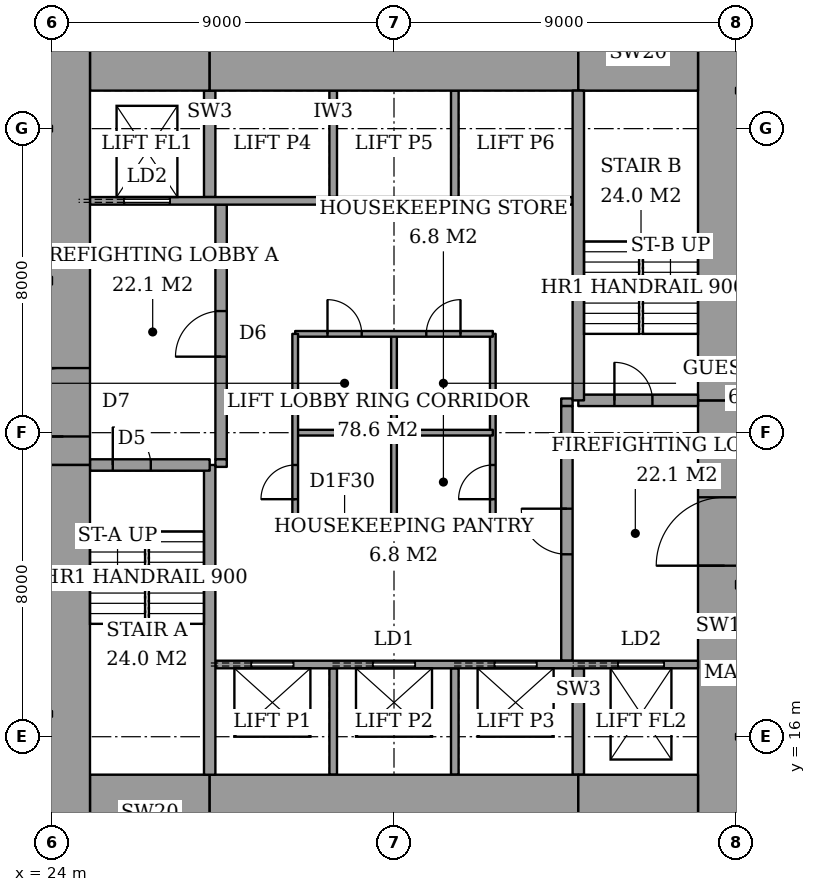
"""IFC4 building model, lengths in metres.
Left out: names, types, materials, properties, quantities, classifications, styles, units other than length and angle.
Written with IfcOpenShell. Run it as: python <this file> out.ifc"""

import sys

from ifc_helpers import new_model, si_unit, direction, frame, frame_2d, origin, place, context, subcontext, project, spatial, rectangle, extrude, element, fill, save


model = new_model("IFC4")
c1 = context("Model", 3, precision=1e-05, world=origin(), true_north=direction((0.0, 1.0)))
c2 = subcontext(c1, "Body", "Model", "MODEL_VIEW")
j1 = project(units=[si_unit("LENGTHUNIT", "METRE"), si_unit("PLANEANGLEUNIT", "RADIAN")], contexts=[c1])
p1 = place(None, origin())
s1 = spatial("IfcSite", under=j1, at=p1, CompositionType="ELEMENT")
p2 = place(p1, origin())
s2 = spatial("IfcBuilding", under=s1, at=p2, CompositionType="ELEMENT")
p3 = place(p2, frame((0.0, 0.0, 80.0)))
s3 = spatial("IfcBuildingStorey", under=s2, at=p3, CompositionType="ELEMENT", Elevation=80.0)
p4 = place(p3, frame((25.0, 14.0, 0.0), z_axis=(0.0, 0.0, 1.0), x_axis=(1.0, 0.0, 0.0)))
e1 = element("IfcWall", 1, at=p4, inside=s3, PredefinedType="SHEAR", context=c2, shape_type="SweptSolid", body=[
    extrude(rectangle(XDim=3.15, YDim=2.0, at=frame_2d((1.575, 0.0))), origin(), (0.0, 0.0, 1.0), 3.6),
])
p5 = place(p3, frame((28.15, 14.0, 0.0), z_axis=(0.0, 0.0, 1.0), x_axis=(1.0, 0.0, 0.0)))
e2 = element("IfcWall", 2, at=p5, inside=s3, PredefinedType="SHEAR", context=c2, shape_type="SweptSolid", body=[
    extrude(rectangle(XDim=9.7, YDim=2.0, at=frame_2d((4.85, 0.0))), origin(), (0.0, 0.0, 1.0), 3.6),
])
for number, where, z_axis, x_axis in (
    (3, (37.85, 14.0, 0.0), (0.0, 0.0, 1.0), (1.0, 0.0, 0.0)),
    (4, (25.0, 34.0, 0.0), (0.0, 0.0, 1.0), (1.0, 0.0, 0.0)),
):
    element("IfcWall", number, at=place(p3, frame(where, z_axis=z_axis, x_axis=x_axis)), inside=s3, PredefinedType="SHEAR", context=c2, shape_type="SweptSolid", body=[
        extrude(rectangle(XDim=3.15, YDim=2.0, at=frame_2d((1.575, 0.0))), origin(), (0.0, 0.0, 1.0), 3.6),
    ])
p6 = place(p3, frame((28.15, 34.0, 0.0), z_axis=(0.0, 0.0, 1.0), x_axis=(1.0, 0.0, 0.0)))
e5 = element("IfcWall", 5, at=p6, inside=s3, PredefinedType="SHEAR", context=c2, shape_type="SweptSolid", body=[
    extrude(rectangle(XDim=9.7, YDim=2.0, at=frame_2d((4.85, 0.0))), origin(), (0.0, 0.0, 1.0), 3.6),
])
p7 = place(p3, frame((37.85, 34.0, 0.0), z_axis=(0.0, 0.0, 1.0), x_axis=(1.0, 0.0, 0.0)))
e6 = element("IfcWall", 6, at=p7, inside=s3, PredefinedType="SHEAR", context=c2, shape_type="SweptSolid", body=[
    extrude(rectangle(XDim=3.15, YDim=2.0, at=frame_2d((1.575, 0.0))), origin(), (0.0, 0.0, 1.0), 3.6),
])
p8 = place(p3, frame((24.3, 13.0, 0.0), z_axis=(0.0, 0.0, 1.0), x_axis=(0.0, 1.0, 0.0)))
e7 = element("IfcWall", 7, at=p8, inside=s3, PredefinedType="SHEAR", context=c2, shape_type="SweptSolid", body=[
    extrude(rectangle(XDim=10.15, YDim=1.4, at=frame_2d((5.075, 0.0))), origin(), (0.0, 0.0, 1.0), 3.6),
])
p9 = place(p3, frame((24.3, 23.15, 0.0), z_axis=(0.0, 0.0, 1.0), x_axis=(0.0, 1.0, 0.0)))
e8 = element("IfcWall", 8, at=p9, inside=s3, PredefinedType="SHEAR", context=c2, shape_type="SweptSolid", body=[
    extrude(rectangle(XDim=11.85, YDim=1.4, at=frame_2d((5.925, 0.0))), origin(), (0.0, 0.0, 1.0), 3.6),
])
p10 = place(p9, frame((0.75, 0.0, 0.0)))
e9 = element("IfcOpeningElement", 9, at=p10, cuts=e8, PredefinedType="OPENING", context=c2, shape_type="SweptSolid", body=[
    extrude(rectangle(XDim=1.8, YDim=2.4, at=frame_2d((0.9, 1.2))), frame((0.0, 0.71, 0.0), z_axis=(0.0, -1.0, 0.0), x_axis=(1.0, 0.0, 0.0)), (0.0, 0.0, 1.0), 1.42),
])
p11 = place(p3, frame((41.7, 13.0, 0.0), z_axis=(0.0, 0.0, 1.0), x_axis=(0.0, 1.0, 0.0)))
e10 = element("IfcWall", 10, at=p11, inside=s3, PredefinedType="SHEAR", context=c2, shape_type="SweptSolid", body=[
    extrude(rectangle(XDim=11.85, YDim=1.4, at=frame_2d((5.925, 0.0))), origin(), (0.0, 0.0, 1.0), 3.6),
])
p12 = place(p11, frame((7.5, 0.0, 0.0)))
e11 = element("IfcOpeningElement", 11, at=p12, cuts=e10, PredefinedType="OPENING", context=c2, shape_type="SweptSolid", body=[
    extrude(rectangle(XDim=1.8, YDim=2.4, at=frame_2d((0.9, 1.2))), frame((0.0, 0.71, 0.0), z_axis=(0.0, -1.0, 0.0), x_axis=(1.0, 0.0, 0.0)), (0.0, 0.0, 1.0), 1.42),
])
p13 = place(p3, frame((41.7, 24.85, 0.0), z_axis=(0.0, 0.0, 1.0), x_axis=(0.0, 1.0, 0.0)))
e12 = element("IfcWall", 12, at=p13, inside=s3, PredefinedType="SHEAR", context=c2, shape_type="SweptSolid", body=[
    extrude(rectangle(XDim=10.15, YDim=1.4, at=frame_2d((5.075, 0.0))), origin(), (0.0, 0.0, 1.0), 3.6),
])
p14 = place(p3, frame((28.15, 15.0, 0.0), z_axis=(0.0, 0.0, 1.0), x_axis=(0.0, 1.0, 0.0)))
e13 = element("IfcWall", 13, at=p14, inside=s3, PredefinedType="SHEAR", context=c2, shape_type="SweptSolid", body=[
    extrude(rectangle(XDim=8.15, YDim=0.3, at=frame_2d((4.075, 0.0))), origin(), (0.0, 0.0, 1.0), 3.6),
])
p15 = place(p3, frame((25.0, 23.15, 0.0), z_axis=(0.0, 0.0, 1.0), x_axis=(1.0, 0.0, 0.0)))
e14 = element("IfcWall", 14, at=p15, inside=s3, PredefinedType="SHEAR", context=c2, shape_type="SweptSolid", body=[
    extrude(rectangle(XDim=3.15, YDim=0.3, at=frame_2d((1.575, 0.0))), origin(), (0.0, 0.0, 1.0), 3.6),
])
p16 = place(p15, frame((0.6, 0.0, 0.0)))
e15 = element("IfcOpeningElement", 15, at=p16, cuts=e14, PredefinedType="OPENING", context=c2, shape_type="SweptSolid", body=[
    extrude(rectangle(XDim=1.0, YDim=2.1, at=frame_2d((0.5, 1.05))), frame((0.0, 0.16, 0.0), z_axis=(0.0, -1.0, 0.0), x_axis=(1.0, 0.0, 0.0)), (0.0, 0.0, 1.0), 0.32),
])
p17 = place(p3, frame((37.85, 24.85, 0.0), z_axis=(0.0, 0.0, 1.0), x_axis=(0.0, 1.0, 0.0)))
e16 = element("IfcWall", 16, at=p17, inside=s3, PredefinedType="SHEAR", context=c2, shape_type="SweptSolid", body=[
    extrude(rectangle(XDim=8.15, YDim=0.3, at=frame_2d((4.075, 0.0))), origin(), (0.0, 0.0, 1.0), 3.6),
])
p18 = place(p3, frame((37.85, 24.85, 0.0), z_axis=(0.0, 0.0, 1.0), x_axis=(1.0, 0.0, 0.0)))
e17 = element("IfcWall", 17, at=p18, inside=s3, PredefinedType="SHEAR", context=c2, shape_type="SweptSolid", body=[
    extrude(rectangle(XDim=3.15, YDim=0.3, at=frame_2d((1.575, 0.0))), origin(), (0.0, 0.0, 1.0), 3.6),
])
p19 = place(p18, frame((0.95, 0.0, 0.0)))
e18 = element("IfcOpeningElement", 18, at=p19, cuts=e17, PredefinedType="OPENING", context=c2, shape_type="SweptSolid", body=[
    extrude(rectangle(XDim=1.0, YDim=2.1, at=frame_2d((0.5, 1.05))), frame((0.0, 0.16, 0.0), z_axis=(0.0, -1.0, 0.0), x_axis=(1.0, 0.0, 0.0)), (0.0, 0.0, 1.0), 0.32),
])
p20 = place(p3, frame((28.45, 23.3, 0.0), z_axis=(0.0, 0.0, 1.0), x_axis=(0.0, 1.0, 0.0)))
e19 = element("IfcWall", 19, at=p20, inside=s3, PredefinedType="PARTITIONING", context=c2, shape_type="SweptSolid", body=[
    extrude(rectangle(XDim=6.7, YDim=0.3, at=frame_2d((3.35, 0.0))), origin(), (0.0, 0.0, 1.0), 3.6),
])
p21 = place(p20, frame((2.7, 0.0, 0.0)))
e20 = element("IfcOpeningElement", 20, at=p21, cuts=e19, PredefinedType="OPENING", context=c2, shape_type="SweptSolid", body=[
    extrude(rectangle(XDim=1.2, YDim=2.1, at=frame_2d((0.6, 1.05))), frame((0.0, 0.16, 0.0), z_axis=(0.0, -1.0, 0.0), x_axis=(1.0, 0.0, 0.0)), (0.0, 0.0, 1.0), 0.32),
])
p22 = place(p3, frame((37.55, 18.0, 0.0), z_axis=(0.0, 0.0, 1.0), x_axis=(0.0, 1.0, 0.0)))
e21 = element("IfcWall", 21, at=p22, inside=s3, PredefinedType="PARTITIONING", context=c2, shape_type="SweptSolid", body=[
    extrude(rectangle(XDim=6.7, YDim=0.3, at=frame_2d((3.35, 0.0))), origin(), (0.0, 0.0, 1.0), 3.6),
])
p23 = place(p22, frame((2.8, 0.0, 0.0)))
e22 = element("IfcOpeningElement", 22, at=p23, cuts=e21, PredefinedType="OPENING", context=c2, shape_type="SweptSolid", body=[
    extrude(rectangle(XDim=1.2, YDim=2.1, at=frame_2d((0.6, 1.05))), frame((0.0, 0.16, 0.0), z_axis=(0.0, -1.0, 0.0), x_axis=(1.0, 0.0, 0.0)), (0.0, 0.0, 1.0), 0.32),
])
p24 = place(p3, frame((28.3, 17.9, 0.0), z_axis=(0.0, 0.0, 1.0), x_axis=(1.0, 0.0, 0.0)))
e23 = element("IfcWall", 23, at=p24, inside=s3, PredefinedType="PARTITIONING", context=c2, shape_type="SweptSolid", body=[
    extrude(rectangle(XDim=12.7, YDim=0.2, at=frame_2d((6.35, 0.0))), origin(), (0.0, 0.0, 1.0), 3.6),
])
p25 = place(p24, frame((0.95, 0.0, 0.0)))
e24 = element("IfcOpeningElement", 24, at=p25, cuts=e23, PredefinedType="OPENING", context=c2, shape_type="SweptSolid", body=[
    extrude(rectangle(XDim=1.1, YDim=2.1, at=frame_2d((0.55, 1.05))), frame((0.0, 0.11, 0.0), z_axis=(0.0, -1.0, 0.0), x_axis=(1.0, 0.0, 0.0)), (0.0, 0.0, 1.0), 0.22),
])
p26 = place(p24, frame((4.15, 0.0, 0.0)))
e25 = element("IfcOpeningElement", 25, at=p26, cuts=e23, PredefinedType="OPENING", context=c2, shape_type="SweptSolid", body=[
    extrude(rectangle(XDim=1.1, YDim=2.1, at=frame_2d((0.55, 1.05))), frame((0.0, 0.11, 0.0), z_axis=(0.0, -1.0, 0.0), x_axis=(1.0, 0.0, 0.0)), (0.0, 0.0, 1.0), 0.22),
])
p27 = place(p24, frame((7.35, 0.0, 0.0)))
e26 = element("IfcOpeningElement", 26, at=p27, cuts=e23, PredefinedType="OPENING", context=c2, shape_type="SweptSolid", body=[
    extrude(rectangle(XDim=1.1, YDim=2.1, at=frame_2d((0.55, 1.05))), frame((0.0, 0.11, 0.0), z_axis=(0.0, -1.0, 0.0), x_axis=(1.0, 0.0, 0.0)), (0.0, 0.0, 1.0), 0.22),
])
p28 = place(p24, frame((10.6, 0.0, 0.0)))
e27 = element("IfcOpeningElement", 27, at=p28, cuts=e23, PredefinedType="OPENING", context=c2, shape_type="SweptSolid", body=[
    extrude(rectangle(XDim=1.2, YDim=2.1, at=frame_2d((0.6, 1.05))), frame((0.0, 0.11, 0.0), z_axis=(0.0, -1.0, 0.0), x_axis=(1.0, 0.0, 0.0)), (0.0, 0.0, 1.0), 0.22),
])
p29 = place(p3, frame((25.0, 30.1, 0.0), z_axis=(0.0, 0.0, 1.0), x_axis=(1.0, 0.0, 0.0)))
e28 = element("IfcWall", 28, at=p29, inside=s3, PredefinedType="PARTITIONING", context=c2, shape_type="SweptSolid", body=[
    extrude(rectangle(XDim=12.7, YDim=0.2, at=frame_2d((6.35, 0.0))), origin(), (0.0, 0.0, 1.0), 3.6),
])
p30 = place(p29, frame((0.9, 0.0, 0.0)))
e29 = element("IfcOpeningElement", 29, at=p30, cuts=e28, PredefinedType="OPENING", context=c2, shape_type="SweptSolid", body=[
    extrude(rectangle(XDim=1.2, YDim=2.1, at=frame_2d((0.6, 1.05))), frame((0.0, 0.11, 0.0), z_axis=(0.0, -1.0, 0.0), x_axis=(1.0, 0.0, 0.0)), (0.0, 0.0, 1.0), 0.22),
])
for number, where, z_axis, x_axis in (
    (30, (31.4, 15.0, 0.0), (0.0, 0.0, 1.0), (0.0, 1.0, 0.0)),
    (31, (34.6, 15.0, 0.0), (0.0, 0.0, 1.0), (0.0, 1.0, 0.0)),
):
    element("IfcWall", number, at=place(p3, frame(where, z_axis=z_axis, x_axis=x_axis)), inside=s3, PredefinedType="PARTITIONING", context=c2, shape_type="SweptSolid", body=[
        extrude(rectangle(XDim=2.8, YDim=0.2, at=frame_2d((1.4, 0.0))), origin(), (0.0, 0.0, 1.0), 3.6),
    ])
p31 = place(p3, frame((37.85, 15.0, 0.0), z_axis=(0.0, 0.0, 1.0), x_axis=(0.0, 1.0, 0.0)))
e32 = element("IfcWall", 32, at=p31, inside=s3, PredefinedType="SHEAR", context=c2, shape_type="SweptSolid", body=[
    extrude(rectangle(XDim=2.8, YDim=0.3, at=frame_2d((1.4, 0.0))), origin(), (0.0, 0.0, 1.0), 3.6),
])
for number, where, z_axis, x_axis in (
    (33, (31.4, 30.2, 0.0), (0.0, 0.0, 1.0), (0.0, 1.0, 0.0)),
    (34, (34.6, 30.2, 0.0), (0.0, 0.0, 1.0), (0.0, 1.0, 0.0)),
):
    element("IfcWall", number, at=place(p3, frame(where, z_axis=z_axis, x_axis=x_axis)), inside=s3, PredefinedType="PARTITIONING", context=c2, shape_type="SweptSolid", body=[
        extrude(rectangle(XDim=2.8, YDim=0.2, at=frame_2d((1.4, 0.0))), origin(), (0.0, 0.0, 1.0), 3.6),
    ])
p32 = place(p3, frame((28.15, 30.2, 0.0), z_axis=(0.0, 0.0, 1.0), x_axis=(0.0, 1.0, 0.0)))
e35 = element("IfcWall", 35, at=p32, inside=s3, PredefinedType="SHEAR", context=c2, shape_type="SweptSolid", body=[
    extrude(rectangle(XDim=2.8, YDim=0.3, at=frame_2d((1.4, 0.0))), origin(), (0.0, 0.0, 1.0), 3.6),
])
for number, where, z_axis, x_axis in (
    (36, (28.3, 23.2, 0.0), (0.0, 0.0, 1.0), (1.0, 0.0, 0.0)),
    (37, (37.4, 24.8, 0.0), (0.0, 0.0, 1.0), (1.0, 0.0, 0.0)),
):
    element("IfcWall", number, at=place(p3, frame(where, z_axis=z_axis, x_axis=x_axis)), inside=s3, PredefinedType="PARTITIONING", context=c2, shape_type="SweptSolid", body=[
        extrude(rectangle(XDim=0.3, YDim=0.2, at=frame_2d((0.15, 0.0))), origin(), (0.0, 0.0, 1.0), 3.6),
    ])
p33 = place(p3, frame((30.4, 21.4, 0.0), z_axis=(0.0, 0.0, 1.0), x_axis=(1.0, 0.0, 0.0)))
e38 = element("IfcWall", 38, at=p33, inside=s3, PredefinedType="PARTITIONING", context=c2, shape_type="SweptSolid", body=[
    extrude(rectangle(XDim=5.2, YDim=0.15, at=frame_2d((2.6, 0.0))), origin(), (0.0, 0.0, 1.0), 3.35),
])
p34 = place(p3, frame((30.4, 26.6, 0.0), z_axis=(0.0, 0.0, 1.0), x_axis=(1.0, 0.0, 0.0)))
e39 = element("IfcWall", 39, at=p34, inside=s3, PredefinedType="PARTITIONING", context=c2, shape_type="SweptSolid", body=[
    extrude(rectangle(XDim=5.2, YDim=0.15, at=frame_2d((2.6, 0.0))), origin(), (0.0, 0.0, 1.0), 3.35),
])
p35 = place(p34, frame((0.85, 0.0, 0.0)))
e40 = element("IfcOpeningElement", 40, at=p35, cuts=e39, PredefinedType="OPENING", context=c2, shape_type="SweptSolid", body=[
    extrude(rectangle(XDim=0.9, YDim=2.1, at=frame_2d((0.45, 1.05))), frame((0.0, 0.085, 0.0), z_axis=(0.0, -1.0, 0.0), x_axis=(1.0, 0.0, 0.0)), (0.0, 0.0, 1.0), 0.17),
])
p36 = place(p34, frame((3.45, 0.0, 0.0)))
e41 = element("IfcOpeningElement", 41, at=p36, cuts=e39, PredefinedType="OPENING", context=c2, shape_type="SweptSolid", body=[
    extrude(rectangle(XDim=0.9, YDim=2.1, at=frame_2d((0.45, 1.05))), frame((0.0, 0.085, 0.0), z_axis=(0.0, -1.0, 0.0), x_axis=(1.0, 0.0, 0.0)), (0.0, 0.0, 1.0), 0.17),
])
p37 = place(p3, frame((30.4, 21.4, 0.0), z_axis=(0.0, 0.0, 1.0), x_axis=(0.0, 1.0, 0.0)))
e42 = element("IfcWall", 42, at=p37, inside=s3, PredefinedType="PARTITIONING", context=c2, shape_type="SweptSolid", body=[
    extrude(rectangle(XDim=5.2, YDim=0.15, at=frame_2d((2.6, 0.0))), origin(), (0.0, 0.0, 1.0), 3.35),
])
p38 = place(p37, frame((0.85, 0.0, 0.0)))
e43 = element("IfcOpeningElement", 43, at=p38, cuts=e42, PredefinedType="OPENING", context=c2, shape_type="SweptSolid", body=[
    extrude(rectangle(XDim=0.9, YDim=2.1, at=frame_2d((0.45, 1.05))), frame((0.0, 0.085, 0.0), z_axis=(0.0, -1.0, 0.0), x_axis=(1.0, 0.0, 0.0)), (0.0, 0.0, 1.0), 0.17),
])
p39 = place(p3, frame((35.6, 21.4, 0.0), z_axis=(0.0, 0.0, 1.0), x_axis=(0.0, 1.0, 0.0)))
e44 = element("IfcWall", 44, at=p39, inside=s3, PredefinedType="PARTITIONING", context=c2, shape_type="SweptSolid", body=[
    extrude(rectangle(XDim=5.2, YDim=0.15, at=frame_2d((2.6, 0.0))), origin(), (0.0, 0.0, 1.0), 3.35),
])
p40 = place(p39, frame((0.85, 0.0, 0.0)))
e45 = element("IfcOpeningElement", 45, at=p40, cuts=e44, PredefinedType="OPENING", context=c2, shape_type="SweptSolid", body=[
    extrude(rectangle(XDim=0.9, YDim=2.1, at=frame_2d((0.45, 1.05))), frame((0.0, 0.085, 0.0), z_axis=(0.0, -1.0, 0.0), x_axis=(1.0, 0.0, 0.0)), (0.0, 0.0, 1.0), 0.17),
])
for number, where, z_axis, x_axis in (
    (46, (30.4, 24.0, 0.0), (0.0, 0.0, 1.0), (1.0, 0.0, 0.0)),
    (47, (33.0, 21.4, 0.0), (0.0, 0.0, 1.0), (0.0, 1.0, 0.0)),
):
    element("IfcWall", number, at=place(p3, frame(where, z_axis=z_axis, x_axis=x_axis)), inside=s3, PredefinedType="PARTITIONING", context=c2, shape_type="SweptSolid", body=[
        extrude(rectangle(XDim=5.2, YDim=0.15, at=frame_2d((2.6, 0.0))), origin(), (0.0, 0.0, 1.0), 3.35),
    ])
p41 = place(p16, origin())
e48 = element("IfcDoor", 48, at=p41, inside=s3, OperationType="SINGLE_SWING_RIGHT", PredefinedType="DOOR", context=c2, shape_type="SweptSolid", body=[
    extrude(rectangle(XDim=1.0, YDim=2.1, at=frame_2d((0.5, 1.05))), frame((0.0, 0.025, 0.0), z_axis=(0.0, -1.0, 0.0), x_axis=(1.0, 0.0, 0.0)), (0.0, 0.0, 1.0), 0.05),
])
fill(e15, e48)
p42 = place(p19, origin())
e49 = element("IfcDoor", 49, at=p42, inside=s3, OperationType="SINGLE_SWING_RIGHT", PredefinedType="DOOR", context=c2, shape_type="SweptSolid", body=[
    extrude(rectangle(XDim=1.0, YDim=2.1, at=frame_2d((0.5, 1.05))), frame((0.0, 0.025, 0.0), z_axis=(0.0, -1.0, 0.0), x_axis=(1.0, 0.0, 0.0)), (0.0, 0.0, 1.0), 0.05),
])
fill(e18, e49)
p43 = place(p21, origin())
e50 = element("IfcDoor", 50, at=p43, inside=s3, OperationType="SINGLE_SWING_RIGHT", PredefinedType="DOOR", context=c2, shape_type="SweptSolid", body=[
    extrude(rectangle(XDim=1.2, YDim=2.1, at=frame_2d((0.6, 1.05))), frame((0.0, 0.025, 0.0), z_axis=(0.0, -1.0, 0.0), x_axis=(1.0, 0.0, 0.0)), (0.0, 0.0, 1.0), 0.05),
])
fill(e20, e50)
p44 = place(p23, origin())
e51 = element("IfcDoor", 51, at=p44, inside=s3, OperationType="SINGLE_SWING_LEFT", PredefinedType="DOOR", context=c2, shape_type="SweptSolid", body=[
    extrude(rectangle(XDim=1.2, YDim=2.1, at=frame_2d((0.6, 1.05))), frame((0.0, 0.025, 0.0), z_axis=(0.0, -1.0, 0.0), x_axis=(1.0, 0.0, 0.0)), (0.0, 0.0, 1.0), 0.05),
])
fill(e22, e51)
p45 = place(p10, origin())
e52 = element("IfcDoor", 52, at=p45, inside=s3, OperationType="DOUBLE_DOOR_DOUBLE_SWING", PredefinedType="DOOR", context=c2, shape_type="SweptSolid", body=[
    extrude(rectangle(XDim=1.8, YDim=2.4, at=frame_2d((0.9, 1.2))), frame((0.0, 0.025, 0.0), z_axis=(0.0, -1.0, 0.0), x_axis=(1.0, 0.0, 0.0)), (0.0, 0.0, 1.0), 0.05),
])
fill(e9, e52)
p46 = place(p12, origin())
e53 = element("IfcDoor", 53, at=p46, inside=s3, OperationType="DOUBLE_DOOR_DOUBLE_SWING", PredefinedType="DOOR", context=c2, shape_type="SweptSolid", body=[
    extrude(rectangle(XDim=1.8, YDim=2.4, at=frame_2d((0.9, 1.2))), frame((0.0, 0.025, 0.0), z_axis=(0.0, -1.0, 0.0), x_axis=(1.0, 0.0, 0.0)), (0.0, 0.0, 1.0), 0.05),
])
fill(e11, e53)
p47 = place(p38, origin())
e54 = element("IfcDoor", 54, at=p47, inside=s3, OperationType="SINGLE_SWING_RIGHT", PredefinedType="DOOR", context=c2, shape_type="SweptSolid", body=[
    extrude(rectangle(XDim=0.9, YDim=2.1, at=frame_2d((0.45, 1.05))), frame((0.0, 0.025, 0.0), z_axis=(0.0, -1.0, 0.0), x_axis=(1.0, 0.0, 0.0)), (0.0, 0.0, 1.0), 0.05),
])
fill(e43, e54)
p48 = place(p40, origin())
e55 = element("IfcDoor", 55, at=p48, inside=s3, OperationType="SINGLE_SWING_RIGHT", PredefinedType="DOOR", context=c2, shape_type="SweptSolid", body=[
    extrude(rectangle(XDim=0.9, YDim=2.1, at=frame_2d((0.45, 1.05))), frame((0.0, 0.025, 0.0), z_axis=(0.0, -1.0, 0.0), x_axis=(1.0, 0.0, 0.0)), (0.0, 0.0, 1.0), 0.05),
])
fill(e45, e55)
p49 = place(p35, origin())
e56 = element("IfcDoor", 56, at=p49, inside=s3, OperationType="SINGLE_SWING_RIGHT", PredefinedType="DOOR", context=c2, shape_type="SweptSolid", body=[
    extrude(rectangle(XDim=0.9, YDim=2.1, at=frame_2d((0.45, 1.05))), frame((0.0, 0.025, 0.0), z_axis=(0.0, -1.0, 0.0), x_axis=(1.0, 0.0, 0.0)), (0.0, 0.0, 1.0), 0.05),
])
fill(e40, e56)
p50 = place(p36, origin())
e57 = element("IfcDoor", 57, at=p50, inside=s3, OperationType="SINGLE_SWING_LEFT", PredefinedType="DOOR", context=c2, shape_type="SweptSolid", body=[
    extrude(rectangle(XDim=0.9, YDim=2.1, at=frame_2d((0.45, 1.05))), frame((0.0, 0.025, 0.0), z_axis=(0.0, -1.0, 0.0), x_axis=(1.0, 0.0, 0.0)), (0.0, 0.0, 1.0), 0.05),
])
fill(e41, e57)
p51 = place(p25, origin())
e58 = element("IfcDoor", 58, at=p51, inside=s3, OperationType="SLIDING_TO_LEFT", PredefinedType="DOOR", context=c2, shape_type="SweptSolid", body=[
    extrude(rectangle(XDim=1.1, YDim=2.1, at=frame_2d((0.55, 1.05))), frame((0.0, 0.025, 0.0), z_axis=(0.0, -1.0, 0.0), x_axis=(1.0, 0.0, 0.0)), (0.0, 0.0, 1.0), 0.05),
])
fill(e24, e58)
p52 = place(p26, origin())
e59 = element("IfcDoor", 59, at=p52, inside=s3, OperationType="SLIDING_TO_LEFT", PredefinedType="DOOR", context=c2, shape_type="SweptSolid", body=[
    extrude(rectangle(XDim=1.1, YDim=2.1, at=frame_2d((0.55, 1.05))), frame((0.0, 0.025, 0.0), z_axis=(0.0, -1.0, 0.0), x_axis=(1.0, 0.0, 0.0)), (0.0, 0.0, 1.0), 0.05),
])
fill(e25, e59)
p53 = place(p27, origin())
e60 = element("IfcDoor", 60, at=p53, inside=s3, OperationType="SLIDING_TO_LEFT", PredefinedType="DOOR", context=c2, shape_type="SweptSolid", body=[
    extrude(rectangle(XDim=1.1, YDim=2.1, at=frame_2d((0.55, 1.05))), frame((0.0, 0.025, 0.0), z_axis=(0.0, -1.0, 0.0), x_axis=(1.0, 0.0, 0.0)), (0.0, 0.0, 1.0), 0.05),
])
fill(e26, e60)
p54 = place(p30, origin())
e61 = element("IfcDoor", 61, at=p54, inside=s3, OperationType="SLIDING_TO_LEFT", PredefinedType="DOOR", context=c2, shape_type="SweptSolid", body=[
    extrude(rectangle(XDim=1.2, YDim=2.1, at=frame_2d((0.6, 1.05))), frame((0.0, 0.025, 0.0), z_axis=(0.0, -1.0, 0.0), x_axis=(1.0, 0.0, 0.0)), (0.0, 0.0, 1.0), 0.05),
])
fill(e29, e61)
p55 = place(p28, origin())
e62 = element("IfcDoor", 62, at=p55, inside=s3, OperationType="SLIDING_TO_LEFT", PredefinedType="DOOR", context=c2, shape_type="SweptSolid", body=[
    extrude(rectangle(XDim=1.2, YDim=2.1, at=frame_2d((0.6, 1.05))), frame((0.0, 0.025, 0.0), z_axis=(0.0, -1.0, 0.0), x_axis=(1.0, 0.0, 0.0)), (0.0, 0.0, 1.0), 0.05),
])
fill(e27, e62)
save(model, sys.argv[1])
